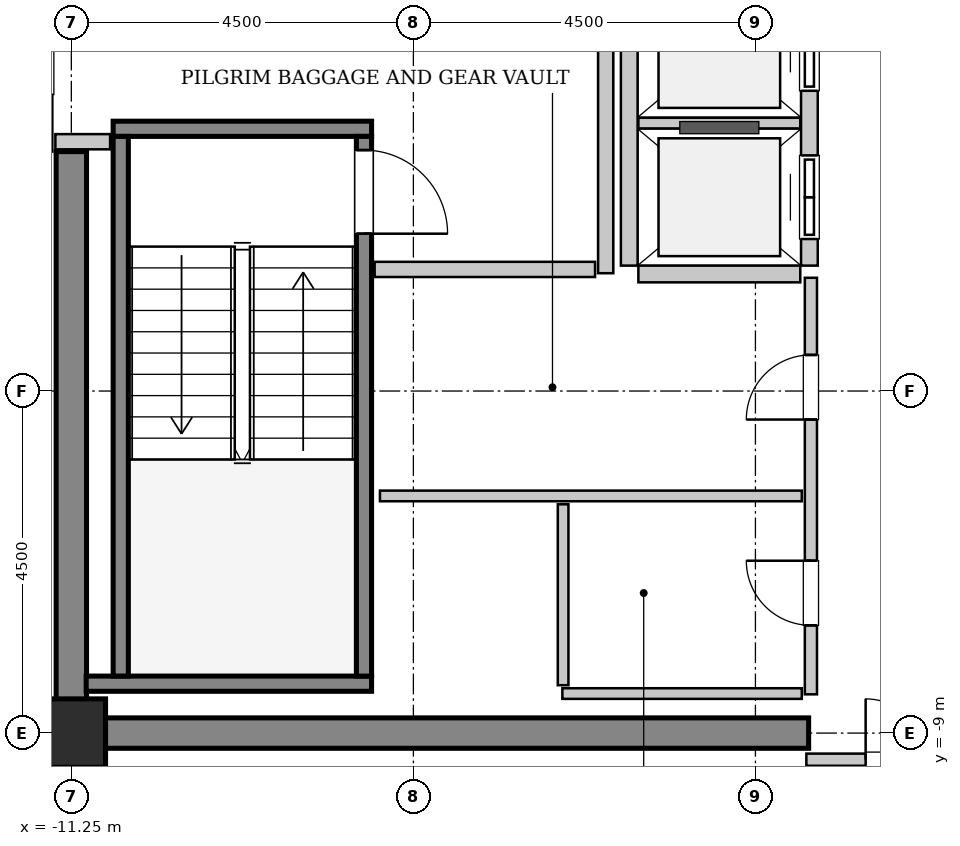
"""IFC4 building model, lengths in metres.
Left out: names, types, materials, properties, quantities, classifications, styles, units other than length and angle.
Written with IfcOpenShell. Run it as: python <this file> out.ifc"""

import sys

from ifc_helpers import new_model, si_unit, direction, frame, frame_2d, origin, origin_2d, place, context, subcontext, project, spatial, rectangle, extrude, source, transform, mapped, element, fill, save


model = new_model("IFC4")
c1 = context("Model", 3, precision=1e-05, world=origin(), true_north=direction((0.0, 1.0)))
c2 = subcontext(c1, "Body", "Model", "MODEL_VIEW")
j1 = project(units=[si_unit("LENGTHUNIT", "METRE"), si_unit("PLANEANGLEUNIT", "RADIAN")], contexts=[c1])
p1 = place(None, origin())
s1 = spatial("IfcSite", under=j1, at=p1, CompositionType="ELEMENT")
p2 = place(p1, origin())
s2 = spatial("IfcBuilding", under=s1, at=p2, CompositionType="ELEMENT")
p3 = place(p2, frame((0.0, 0.0, 341.4)))
s3 = spatial("IfcBuildingStorey", under=s2, at=p3, CompositionType="ELEMENT", Elevation=341.4)
m1 = source(origin(), c2, "Body", "SweptSolid", [
    extrude(rectangle(XDim=9.9, YDim=0.4, at=frame_2d((4.95, 0.0))), origin(), (0.0, 0.0, 1.0), 3.8),
])
p4 = place(p3, frame((-11.45, -9.0, 0.0), z_axis=(0.0, 0.0, 1.0), x_axis=(1.0, 0.0, 0.0)))
e1 = element("IfcWall", 1, at=p4, inside=s3, PredefinedType="SHEAR", context=c2, shape_type="MappedRepresentation", body=[
    mapped(m1, transform((0.0, 0.0, 0.0), x_axis=(1.0, 0.0, 0.0), y_axis=(0.0, 1.0, 0.0), z_axis=(0.0, 0.0, 1.0), scale=1.0)),
])
m2 = source(origin(), c2, "Body", "SweptSolid", [
    extrude(rectangle(XDim=7.45, YDim=0.4, at=frame_2d((3.725, 0.0))), origin(), (0.0, 0.0, 1.0), 3.8),
])
p5 = place(p3, frame((-11.25, -8.8, 0.0), z_axis=(0.0, 0.0, 1.0), x_axis=(0.0, 1.0, 0.0)))
e2 = element("IfcWall", 2, at=p5, inside=s3, PredefinedType="SHEAR", context=c2, shape_type="MappedRepresentation", body=[
    mapped(m2, transform((0.0, 0.0, 0.0), x_axis=(1.0, 0.0, 0.0), y_axis=(0.0, 1.0, 0.0), z_axis=(0.0, 0.0, 1.0), scale=1.0)),
])
m3 = source(origin(), c2, "Body", "SweptSolid", [
    extrude(rectangle(XDim=0.9, YDim=0.9, at=origin_2d()), origin(), (0.0, 0.0, 1.0), 3.8),
])
p6 = place(p3, frame((-11.25, -9.0, 0.0), z_axis=(0.0, 0.0, 1.0), x_axis=(1.0, 0.0, 0.0)))
e3 = element("IfcColumn", 3, at=p6, inside=s3, PredefinedType="COLUMN", context=c2, shape_type="MappedRepresentation", body=[
    mapped(m3, transform((0.0, 0.0, 0.0), x_axis=(1.0, 0.0, 0.0), y_axis=(0.0, 1.0, 0.0), z_axis=(0.0, 0.0, 1.0), scale=1.0)),
])
m4 = source(origin(), c2, "Body", "SweptSolid", [
    extrude(rectangle(XDim=3.4, YDim=0.2, at=frame_2d((1.7, 0.0))), origin(), (0.0, 0.0, 1.0), 3.8),
])
p7 = place(p3, frame((-10.7, -1.05, 0.0), z_axis=(0.0, 0.0, 1.0), x_axis=(1.0, 0.0, 0.0)))
e4 = element("IfcWall", 4, at=p7, inside=s3, PredefinedType="SOLIDWALL", context=c2, shape_type="MappedRepresentation", body=[
    mapped(m4, transform((0.0, 0.0, 0.0), x_axis=(1.0, 0.0, 0.0), y_axis=(0.0, 1.0, 0.0), z_axis=(0.0, 0.0, 1.0), scale=1.0)),
])
m5 = source(origin(), c2, "Body", "SweptSolid", [
    extrude(rectangle(XDim=3.755, YDim=0.2, at=frame_2d((1.877, 0.0))), origin(), (0.0, 0.0, 1.0), 3.8),
])
p8 = place(p3, frame((-11.055, -8.35, 0.0), z_axis=(0.0, 0.0, 1.0), x_axis=(1.0, 0.0, 0.0)))
e5 = element("IfcWall", 5, at=p8, inside=s3, PredefinedType="SOLIDWALL", context=c2, shape_type="MappedRepresentation", body=[
    mapped(m5, transform((0.0, 0.0, 0.0), x_axis=(1.0, 0.0, 0.0), y_axis=(0.0, 1.0, 0.0), z_axis=(0.0, 0.0, 1.0), scale=1.0)),
])
m6 = source(origin(), c2, "Body", "SweptSolid", [
    extrude(rectangle(XDim=7.1, YDim=0.2, at=frame_2d((3.55, 0.0))), origin(), (0.0, 0.0, 1.0), 3.8),
])
p9 = place(p3, frame((-10.6, -1.15, 0.0), z_axis=(0.0, 0.0, 1.0), x_axis=(0.0, -1.0, 0.0)))
e6 = element("IfcWall", 6, at=p9, inside=s3, PredefinedType="SOLIDWALL", context=c2, shape_type="MappedRepresentation", body=[
    mapped(m6, transform((0.0, 0.0, 0.0), x_axis=(1.0, 0.0, 0.0), y_axis=(0.0, 1.0, 0.0), z_axis=(0.0, 0.0, 1.0), scale=1.0)),
])
p10 = place(p3, frame((-7.4, -1.15, 0.0), z_axis=(0.0, 0.0, 1.0), x_axis=(0.0, -1.0, 0.0)))
e7 = element("IfcWall", 7, at=p10, inside=s3, PredefinedType="SOLIDWALL", context=c2, shape_type="MappedRepresentation", body=[
    mapped(m6, transform((0.0, 0.0, 0.0), x_axis=(1.0, 0.0, 0.0), y_axis=(0.0, 1.0, 0.0), z_axis=(0.0, 0.0, 1.0), scale=1.0)),
])
p11 = place(p10, frame((0.18, 0.0, 0.0)))
e8 = element("IfcOpeningElement", 8, at=p11, cuts=e7, PredefinedType="OPENING", context=c2, shape_type="SweptSolid", body=[
    extrude(rectangle(XDim=1.1, YDim=2.15, at=frame_2d((0.55, 1.075))), frame((0.0, 0.11, 0.0), z_axis=(0.0, -1.0, 0.0), x_axis=(1.0, 0.0, 0.0)), (0.0, 0.0, 1.0), 0.22),
])
m7 = source(origin(), c2, "Body", "SweptSolid", [
    extrude(rectangle(XDim=5.7, YDim=0.22, at=frame_2d((2.85, 0.0))), origin(), (0.0, 0.0, 1.0), 3.535),
])
p12 = place(p3, frame((-1.54, -2.85, 0.0), z_axis=(0.0, 0.0, 1.0), x_axis=(0.0, 1.0, 0.0)))
e9 = element("IfcWall", 9, at=p12, inside=s3, PredefinedType="SOLIDWALL", context=c2, shape_type="MappedRepresentation", body=[
    mapped(m7, transform((0.0, 0.0, 0.0), x_axis=(1.0, 0.0, 0.0), y_axis=(0.0, 1.0, 0.0), z_axis=(0.0, 0.0, 1.0), scale=1.0)),
])
p13 = place(p12, frame((0.35, 0.0, 0.0)))
e10 = element("IfcOpeningElement", 10, at=p13, cuts=e9, PredefinedType="OPENING", context=c2, shape_type="SweptSolid", body=[
    extrude(rectangle(XDim=1.1, YDim=2.2, at=frame_2d((0.55, 1.1))), frame((0.0, 0.12, 0.0), z_axis=(0.0, -1.0, 0.0), x_axis=(1.0, 0.0, 0.0)), (0.0, 0.0, 1.0), 0.24),
])
p14 = place(p12, frame((2.3, 0.0, 0.0)))
e11 = element("IfcOpeningElement", 11, at=p14, cuts=e9, PredefinedType="OPENING", context=c2, shape_type="SweptSolid", body=[
    extrude(rectangle(XDim=1.1, YDim=2.2, at=frame_2d((0.55, 1.1))), frame((0.0, 0.12, 0.0), z_axis=(0.0, -1.0, 0.0), x_axis=(1.0, 0.0, 0.0)), (0.0, 0.0, 1.0), 0.24),
])
p15 = place(p12, frame((4.25, 0.0, 0.0)))
e12 = element("IfcOpeningElement", 12, at=p15, cuts=e9, PredefinedType="OPENING", context=c2, shape_type="SweptSolid", body=[
    extrude(rectangle(XDim=1.1, YDim=2.2, at=frame_2d((0.55, 1.1))), frame((0.0, 0.12, 0.0), z_axis=(0.0, -1.0, 0.0), x_axis=(1.0, 0.0, 0.0)), (0.0, 0.0, 1.0), 0.24),
])
p16 = place(p3, frame((-3.91, 2.85, 0.0), z_axis=(0.0, 0.0, 1.0), x_axis=(0.0, -1.0, 0.0)))
e13 = element("IfcWall", 13, at=p16, inside=s3, PredefinedType="SOLIDWALL", context=c2, shape_type="MappedRepresentation", body=[
    mapped(m7, transform((0.0, 0.0, 0.0), x_axis=(1.0, 0.0, 0.0), y_axis=(0.0, 1.0, 0.0), z_axis=(0.0, 0.0, 1.0), scale=1.0)),
])
m8 = source(origin(), c2, "Body", "SweptSolid", [
    extrude(rectangle(XDim=2.13, YDim=0.22, at=frame_2d((1.065, 0.0))), origin(), (0.0, 0.0, 1.0), 3.535),
])
p17 = place(p3, frame((-3.79, -2.96, 0.0), z_axis=(0.0, 0.0, 1.0), x_axis=(1.0, 0.0, 0.0)))
e14 = element("IfcWall", 14, at=p17, inside=s3, PredefinedType="SOLIDWALL", context=c2, shape_type="MappedRepresentation", body=[
    mapped(m8, transform((0.0, 0.0, 0.0), x_axis=(1.0, 0.0, 0.0), y_axis=(0.0, 1.0, 0.0), z_axis=(0.0, 0.0, 1.0), scale=1.0)),
])
m9 = source(origin(), c2, "Body", "SweptSolid", [
    extrude(rectangle(XDim=2.13, YDim=0.14, at=frame_2d((1.065, 0.0))), origin(), (0.0, 0.0, 1.0), 3.535),
])
p18 = place(p3, frame((-3.79, -0.975, 0.0), z_axis=(0.0, 0.0, 1.0), x_axis=(1.0, 0.0, 0.0)))
e15 = element("IfcWall", 15, at=p18, inside=s3, PredefinedType="PARTITIONING", context=c2, shape_type="MappedRepresentation", body=[
    mapped(m9, transform((0.0, 0.0, 0.0), x_axis=(1.0, 0.0, 0.0), y_axis=(0.0, 1.0, 0.0), z_axis=(0.0, 0.0, 1.0), scale=1.0)),
])
m10 = source(origin(), c2, "Body", "SweptSolid", [
    extrude(rectangle(XDim=5.9, YDim=0.2, at=frame_2d((2.95, 0.0))), origin(), (0.0, 0.0, 1.0), 3.535),
])
p19 = place(p3, frame((-4.22, -2.95, 0.0), z_axis=(0.0, 0.0, 1.0), x_axis=(0.0, 1.0, 0.0)))
e16 = element("IfcWall", 16, at=p19, inside=s3, PredefinedType="PARTITIONING", context=c2, shape_type="MappedRepresentation", body=[
    mapped(m10, transform((0.0, 0.0, 0.0), x_axis=(1.0, 0.0, 0.0), y_axis=(0.0, 1.0, 0.0), z_axis=(0.0, 0.0, 1.0), scale=1.0)),
])
m11 = source(origin(), c2, "Body", "SweptSolid", [
    extrude(rectangle(XDim=2.9, YDim=0.2, at=frame_2d((1.45, 0.0))), origin(), (0.0, 0.0, 1.0), 3.535),
])
p20 = place(p3, frame((-7.26, -2.9, 0.0), z_axis=(0.0, 0.0, 1.0), x_axis=(1.0, 0.0, 0.0)))
e17 = element("IfcWall", 17, at=p20, inside=s3, PredefinedType="PARTITIONING", context=c2, shape_type="MappedRepresentation", body=[
    mapped(m11, transform((0.0, 0.0, 0.0), x_axis=(1.0, 0.0, 0.0), y_axis=(0.0, 1.0, 0.0), z_axis=(0.0, 0.0, 1.0), scale=1.0)),
])
m12 = source(origin(), c2, "Body", "SweptSolid", [
    extrude(rectangle(XDim=0.72, YDim=0.2, at=frame_2d((0.36, 0.0))), origin(), (0.0, 0.0, 1.0), 3.535),
])
p21 = place(p3, frame((-11.46, -1.22, 0.0), z_axis=(0.0, 0.0, 1.0), x_axis=(1.0, 0.0, 0.0)))
e18 = element("IfcWall", 18, at=p21, inside=s3, PredefinedType="PARTITIONING", context=c2, shape_type="MappedRepresentation", body=[
    mapped(m12, transform((0.0, 0.0, 0.0), x_axis=(1.0, 0.0, 0.0), y_axis=(0.0, 1.0, 0.0), z_axis=(0.0, 0.0, 1.0), scale=1.0)),
])
m13 = source(origin(), c2, "Body", "SweptSolid", [
    extrude(rectangle(XDim=3.16, YDim=0.16, at=frame_2d((1.58, 0.0))), origin(), (0.0, 0.0, 1.0), 2.625),
])
p22 = place(p3, frame((-1.58, -9.35, 0.0), z_axis=(0.0, 0.0, 1.0), x_axis=(1.0, 0.0, 0.0)))
e19 = element("IfcWall", 19, at=p22, inside=s3, PredefinedType="PARTITIONING", context=c2, shape_type="MappedRepresentation", body=[
    mapped(m13, transform((0.0, 0.0, 0.0), x_axis=(1.0, 0.0, 0.0), y_axis=(0.0, 1.0, 0.0), z_axis=(0.0, 0.0, 1.0), scale=1.0)),
])
p23 = place(p22, frame((0.78, 0.0, 0.0)))
e20 = element("IfcOpeningElement", 20, at=p23, cuts=e19, PredefinedType="OPENING", context=c2, shape_type="SweptSolid", body=[
    extrude(rectangle(XDim=1.6, YDim=2.3, at=frame_2d((0.8, 1.15))), frame((0.0, 0.09, 0.0), z_axis=(0.0, -1.0, 0.0), x_axis=(1.0, 0.0, 0.0)), (0.0, 0.0, 1.0), 0.18),
])
m14 = source(origin(), c2, "Body", "SweptSolid", [
    extrude(rectangle(XDim=5.48, YDim=0.16, at=frame_2d((2.74, 0.0))), origin(), (0.0, 0.0, 1.0), 3.535),
])
p24 = place(p3, frame((-1.52, -8.49, 0.0), z_axis=(0.0, 0.0, 1.0), x_axis=(0.0, 1.0, 0.0)))
e21 = element("IfcWall", 21, at=p24, inside=s3, PredefinedType="PARTITIONING", context=c2, shape_type="MappedRepresentation", body=[
    mapped(m14, transform((0.0, 0.0, 0.0), x_axis=(1.0, 0.0, 0.0), y_axis=(0.0, 1.0, 0.0), z_axis=(0.0, 0.0, 1.0), scale=1.0)),
])
p25 = place(p24, frame((0.907, 0.0, 0.0)))
e22 = element("IfcOpeningElement", 22, at=p25, cuts=e21, PredefinedType="OPENING", context=c2, shape_type="SweptSolid", body=[
    extrude(rectangle(XDim=0.85, YDim=2.1, at=frame_2d((0.425, 1.05))), frame((0.0, 0.09, 0.0), z_axis=(0.0, -1.0, 0.0), x_axis=(1.0, 0.0, 0.0)), (0.0, 0.0, 1.0), 0.18),
])
p26 = place(p24, frame((3.615, 0.0, 0.0)))
e23 = element("IfcOpeningElement", 23, at=p26, cuts=e21, PredefinedType="OPENING", context=c2, shape_type="SweptSolid", body=[
    extrude(rectangle(XDim=0.85, YDim=2.1, at=frame_2d((0.425, 1.05))), frame((0.0, 0.09, 0.0), z_axis=(0.0, -1.0, 0.0), x_axis=(1.0, 0.0, 0.0)), (0.0, 0.0, 1.0), 0.18),
])
m15 = source(origin(), c2, "Body", "SweptSolid", [
    extrude(rectangle(XDim=5.55, YDim=0.14, at=frame_2d((2.775, 0.0))), origin(), (0.0, 0.0, 1.0), 3.535),
])
p27 = place(p3, frame((-7.19, -5.88, 0.0), z_axis=(0.0, 0.0, 1.0), x_axis=(1.0, 0.0, 0.0)))
e24 = element("IfcWall", 24, at=p27, inside=s3, PredefinedType="PARTITIONING", context=c2, shape_type="MappedRepresentation", body=[
    mapped(m15, transform((0.0, 0.0, 0.0), x_axis=(1.0, 0.0, 0.0), y_axis=(0.0, 1.0, 0.0), z_axis=(0.0, 0.0, 1.0), scale=1.0)),
])
m16 = source(origin(), c2, "Body", "SweptSolid", [
    extrude(rectangle(XDim=3.15, YDim=0.14, at=frame_2d((1.575, 0.0))), origin(), (0.0, 0.0, 1.0), 3.535),
])
p28 = place(p3, frame((-4.79, -8.48, 0.0), z_axis=(0.0, 0.0, 1.0), x_axis=(1.0, 0.0, 0.0)))
e25 = element("IfcWall", 25, at=p28, inside=s3, PredefinedType="PARTITIONING", context=c2, shape_type="MappedRepresentation", body=[
    mapped(m16, transform((0.0, 0.0, 0.0), x_axis=(1.0, 0.0, 0.0), y_axis=(0.0, 1.0, 0.0), z_axis=(0.0, 0.0, 1.0), scale=1.0)),
])
m17 = source(origin(), c2, "Body", "SweptSolid", [
    extrude(rectangle(XDim=2.38, YDim=0.14, at=frame_2d((1.19, 0.0))), origin(), (0.0, 0.0, 1.0), 3.535),
])
p29 = place(p3, frame((-4.78, -8.37, 0.0), z_axis=(0.0, 0.0, 1.0), x_axis=(0.0, 1.0, 0.0)))
e26 = element("IfcWall", 26, at=p29, inside=s3, PredefinedType="PARTITIONING", context=c2, shape_type="MappedRepresentation", body=[
    mapped(m17, transform((0.0, 0.0, 0.0), x_axis=(1.0, 0.0, 0.0), y_axis=(0.0, 1.0, 0.0), z_axis=(0.0, 0.0, 1.0), scale=1.0)),
])
m18 = source(origin(), c2, "Body", "SweptSolid", [
    extrude(rectangle(XDim=1.1, YDim=2.15, at=frame_2d((0.55, 1.075))), frame((0.0, 0.025, 0.0), z_axis=(0.0, -1.0, 0.0), x_axis=(1.0, 0.0, 0.0)), (0.0, 0.0, 1.0), 0.05),
])
p30 = place(p11, origin())
e27 = element("IfcDoor", 27, at=p30, inside=s3, OperationType="SINGLE_SWING_RIGHT", PredefinedType="DOOR", context=c2, shape_type="MappedRepresentation", body=[
    mapped(m18, transform((0.0, 0.0, 0.0), x_axis=(1.0, 0.0, 0.0), y_axis=(0.0, 1.0, 0.0), z_axis=(0.0, 0.0, 1.0), scale=1.0)),
])
fill(e8, e27)
m19 = source(origin(), c2, "Body", "SweptSolid", [
    extrude(rectangle(XDim=1.1, YDim=2.2, at=frame_2d((0.55, 1.1))), frame((0.0, 0.025, 0.0), z_axis=(0.0, -1.0, 0.0), x_axis=(1.0, 0.0, 0.0)), (0.0, 0.0, 1.0), 0.05),
])
p31 = place(p13, origin())
e28 = element("IfcDoor", 28, at=p31, inside=s3, OperationType="DOUBLE_DOOR_SLIDING", PredefinedType="DOOR", context=c2, shape_type="MappedRepresentation", body=[
    mapped(m19, transform((0.0, 0.0, 0.0), x_axis=(1.0, 0.0, 0.0), y_axis=(0.0, 1.0, 0.0), z_axis=(0.0, 0.0, 1.0), scale=1.0)),
])
fill(e10, e28)
p32 = place(p14, origin())
e29 = element("IfcDoor", 29, at=p32, inside=s3, OperationType="DOUBLE_DOOR_SLIDING", PredefinedType="DOOR", context=c2, shape_type="MappedRepresentation", body=[
    mapped(m19, transform((0.0, 0.0, 0.0), x_axis=(1.0, 0.0, 0.0), y_axis=(0.0, 1.0, 0.0), z_axis=(0.0, 0.0, 1.0), scale=1.0)),
])
fill(e11, e29)
m20 = source(origin(), c2, "Body", "SweptSolid", [
    extrude(rectangle(XDim=1.6, YDim=2.3, at=frame_2d((0.8, 1.15))), frame((0.0, 0.025, 0.0), z_axis=(0.0, -1.0, 0.0), x_axis=(1.0, 0.0, 0.0)), (0.0, 0.0, 1.0), 0.05),
])
p33 = place(p23, origin())
e30 = element("IfcDoor", 30, at=p33, inside=s3, OperationType="DOUBLE_DOOR_SINGLE_SWING", PredefinedType="DOOR", context=c2, shape_type="MappedRepresentation", body=[
    mapped(m20, transform((0.0, 0.0, 0.0), x_axis=(1.0, 0.0, 0.0), y_axis=(0.0, 1.0, 0.0), z_axis=(0.0, 0.0, 1.0), scale=1.0)),
])
fill(e20, e30)
m21 = source(origin(), c2, "Body", "SweptSolid", [
    extrude(rectangle(XDim=0.85, YDim=2.1, at=frame_2d((0.425, 1.05))), frame((0.0, 0.025, 0.0), z_axis=(0.0, -1.0, 0.0), x_axis=(1.0, 0.0, 0.0)), (0.0, 0.0, 1.0), 0.05),
])
p34 = place(p25, origin())
e31 = element("IfcDoor", 31, at=p34, inside=s3, OperationType="SINGLE_SWING_RIGHT", PredefinedType="DOOR", context=c2, shape_type="MappedRepresentation", body=[
    mapped(m21, transform((0.0, 0.0, 0.0), x_axis=(1.0, 0.0, 0.0), y_axis=(0.0, 1.0, 0.0), z_axis=(0.0, 0.0, 1.0), scale=1.0)),
])
fill(e22, e31)
p35 = place(p26, origin())
e32 = element("IfcDoor", 32, at=p35, inside=s3, OperationType="SINGLE_SWING_LEFT", PredefinedType="DOOR", context=c2, shape_type="MappedRepresentation", body=[
    mapped(m21, transform((0.0, 0.0, 0.0), x_axis=(1.0, 0.0, 0.0), y_axis=(0.0, 1.0, 0.0), z_axis=(0.0, 0.0, 1.0), scale=1.0)),
])
fill(e23, e32)
save(model, sys.argv[1])
